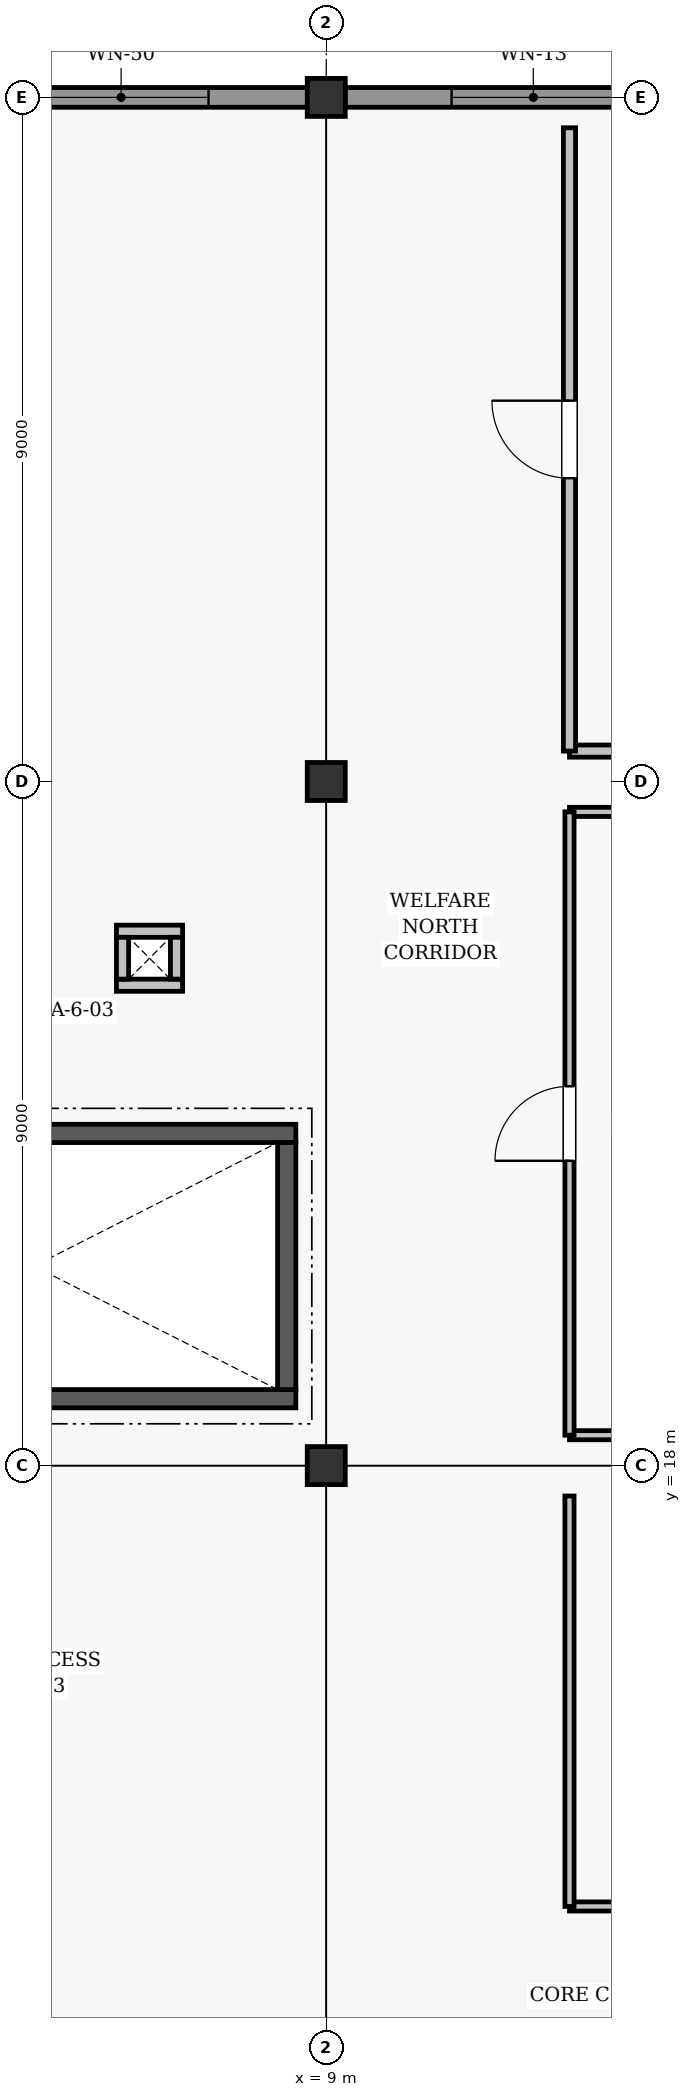
"""IFC4 building model, lengths in metres.
Left out: names, types, materials, properties, quantities, classifications, styles, units other than length and angle.
Written with IfcOpenShell. Run it as: python <this file> out.ifc"""

import sys

from ifc_helpers import new_model, si_unit, direction, frame, frame_2d, origin, origin_2d, place, context, subcontext, project, spatial, rectangle, extrude, element, fill, save


model = new_model("IFC4")
c1 = context("Model", 3, precision=1e-05, world=origin(), true_north=direction((0.0, 1.0)))
c2 = subcontext(c1, "Body", "Model", "MODEL_VIEW")
j1 = project(units=[si_unit("LENGTHUNIT", "METRE"), si_unit("PLANEANGLEUNIT", "RADIAN")], contexts=[c1])
p1 = place(None, origin())
s1 = spatial("IfcSite", under=j1, at=p1, CompositionType="ELEMENT")
p2 = place(p1, origin())
s2 = spatial("IfcBuilding", under=s1, at=p2, CompositionType="ELEMENT")
p3 = place(p2, frame((0.0, 0.0, 12.0)))
s3 = spatial("IfcBuildingStorey", under=s2, at=p3, CompositionType="ELEMENT", Elevation=12.0)
for number, where, z_axis, x_axis in (
    (1, (9.0, 18.0, 0.0), (0.0, 0.0, 1.0), (1.0, 0.0, 0.0)),
    (2, (9.0, 27.0, 0.0), (0.0, 0.0, 1.0), (1.0, 0.0, 0.0)),
    (3, (9.0, 36.0, 0.0), (0.0, 0.0, 1.0), (1.0, 0.0, 0.0)),
):
    element("IfcColumn", number, at=place(p3, frame(where, z_axis=z_axis, x_axis=x_axis)), inside=s3, PredefinedType="COLUMN", context=c2, shape_type="SweptSolid", body=[
        extrude(rectangle(XDim=0.5, YDim=0.5, at=origin_2d()), origin(), (0.0, 0.0, 1.0), 3.0),
    ])
p4 = place(p3, frame((0.248, 36.0, 0.0), z_axis=(0.0, 0.0, 1.0), x_axis=(1.0, 0.0, 0.0)))
e4 = element("IfcWall", 4, at=p4, inside=s3, PredefinedType="SOLIDWALL", context=c2, shape_type="SweptSolid", body=[
    extrude(rectangle(XDim=8.504, YDim=0.26, at=frame_2d((4.252, 0.0))), origin(), (0.0, 0.0, 1.0), 2.262),
])
p5 = place(p4, frame((1.301, 0.0, 0.92)))
e5 = element("IfcOpeningElement", 5, at=p5, cuts=e4, PredefinedType="OPENING", context=c2, shape_type="SweptSolid", body=[
    extrude(rectangle(XDim=2.3, YDim=1.16, at=frame_2d((1.15, 0.58))), frame((0.0, 0.14, 0.0), z_axis=(0.0, -1.0, 0.0), x_axis=(1.0, 0.0, 0.0)), (0.0, 0.0, 1.0), 0.28),
])
p6 = place(p4, frame((4.903, 0.0, 0.92)))
e6 = element("IfcOpeningElement", 6, at=p6, cuts=e4, PredefinedType="OPENING", context=c2, shape_type="SweptSolid", body=[
    extrude(rectangle(XDim=2.3, YDim=1.16, at=frame_2d((1.15, 0.58))), frame((0.0, 0.14, 0.0), z_axis=(0.0, -1.0, 0.0), x_axis=(1.0, 0.0, 0.0)), (0.0, 0.0, 1.0), 0.28),
])
p7 = place(p3, frame((9.248, 36.0, 0.0), z_axis=(0.0, 0.0, 1.0), x_axis=(1.0, 0.0, 0.0)))
e7 = element("IfcWall", 7, at=p7, inside=s3, PredefinedType="SOLIDWALL", context=c2, shape_type="SweptSolid", body=[
    extrude(rectangle(XDim=8.504, YDim=0.26, at=frame_2d((4.252, 0.0))), origin(), (0.0, 0.0, 1.0), 2.262),
])
p8 = place(p7, frame((1.401, 0.0, 0.96)))
e8 = element("IfcOpeningElement", 8, at=p8, cuts=e7, PredefinedType="OPENING", context=c2, shape_type="SweptSolid", body=[
    extrude(rectangle(XDim=2.15, YDim=1.12, at=frame_2d((1.075, 0.56))), frame((0.0, 0.14, 0.0), z_axis=(0.0, -1.0, 0.0), x_axis=(1.0, 0.0, 0.0)), (0.0, 0.0, 1.0), 0.28),
])
p9 = place(p7, frame((4.953, 0.0, 0.96)))
e9 = element("IfcOpeningElement", 9, at=p9, cuts=e7, PredefinedType="OPENING", context=c2, shape_type="SweptSolid", body=[
    extrude(rectangle(XDim=2.15, YDim=1.12, at=frame_2d((1.075, 0.56))), frame((0.0, 0.14, 0.0), z_axis=(0.0, -1.0, 0.0), x_axis=(1.0, 0.0, 0.0)), (0.0, 0.0, 1.0), 0.28),
])
p10 = place(p3, frame((0.16, 18.88, 0.0), z_axis=(0.0, 0.0, 1.0), x_axis=(1.0, 0.0, 0.0)))
e10 = element("IfcWall", 10, at=p10, inside=s3, PredefinedType="SHEAR", context=c2, shape_type="SweptSolid", body=[
    extrude(rectangle(XDim=8.44, YDim=0.24, at=frame_2d((4.22, 0.0))), origin(), (0.0, 0.0, 1.0), 2.75),
])
p11 = place(p10, frame((0.48, 0.0, 0.0)))
e11 = element("IfcOpeningElement", 11, at=p11, cuts=e10, PredefinedType="OPENING", context=c2, shape_type="SweptSolid", body=[
    extrude(rectangle(XDim=1.08, YDim=2.08, at=frame_2d((0.54, 1.04))), frame((0.0, 0.13, 0.0), z_axis=(0.0, -1.0, 0.0), x_axis=(1.0, 0.0, 0.0)), (0.0, 0.0, 1.0), 0.26),
])
p12 = place(p3, frame((0.16, 22.37, 0.0), z_axis=(0.0, 0.0, 1.0), x_axis=(1.0, 0.0, 0.0)))
e12 = element("IfcWall", 12, at=p12, inside=s3, PredefinedType="SHEAR", context=c2, shape_type="SweptSolid", body=[
    extrude(rectangle(XDim=8.44, YDim=0.24, at=frame_2d((4.22, 0.0))), origin(), (0.0, 0.0, 1.0), 2.75),
])
p13 = place(p3, frame((8.48, 19.0, 0.0), z_axis=(0.0, 0.0, 1.0), x_axis=(0.0, 1.0, 0.0)))
e13 = element("IfcWall", 13, at=p13, inside=s3, PredefinedType="SHEAR", context=c2, shape_type="SweptSolid", body=[
    extrude(rectangle(XDim=3.25, YDim=0.24, at=frame_2d((1.625, 0.0))), origin(), (0.0, 0.0, 1.0), 2.75),
])
for number, where, z_axis, x_axis in (
    (14, (6.24, 24.32, 0.0), (0.0, 0.0, 1.0), (1.0, 0.0, 0.0)),
    (15, (6.24, 25.03, 0.0), (0.0, 0.0, 1.0), (1.0, 0.0, 0.0)),
):
    element("IfcWall", number, at=place(p3, frame(where, z_axis=z_axis, x_axis=x_axis)), inside=s3, PredefinedType="PARTITIONING", context=c2, shape_type="SweptSolid", body=[
        extrude(rectangle(XDim=0.87, YDim=0.16, at=frame_2d((0.435, 0.0))), origin(), (0.0, 0.0, 1.0), 2.75),
    ])
for number, where, z_axis, x_axis in (
    (16, (6.32, 24.4, 0.0), (0.0, 0.0, 1.0), (0.0, 1.0, 0.0)),
    (17, (7.03, 24.4, 0.0), (0.0, 0.0, 1.0), (0.0, 1.0, 0.0)),
):
    element("IfcWall", number, at=place(p3, frame(where, z_axis=z_axis, x_axis=x_axis)), inside=s3, PredefinedType="PARTITIONING", context=c2, shape_type="SweptSolid", body=[
        extrude(rectangle(XDim=0.55, YDim=0.16, at=frame_2d((0.275, 0.0))), origin(), (0.0, 0.0, 1.0), 2.75),
    ])
p14 = place(p3, frame((12.2, 12.2, 0.0), z_axis=(0.0, 0.0, 1.0), x_axis=(1.0, 0.0, 0.0)))
e18 = element("IfcWall", 18, at=p14, inside=s3, PredefinedType="PARTITIONING", context=c2, shape_type="SweptSolid", body=[
    extrude(rectangle(XDim=32.4, YDim=0.12, at=frame_2d((16.2, 0.0))), origin(), (0.0, 0.0, 1.0), 2.295),
])
p15 = place(p14, frame((18.43, 0.0, 0.0)))
e19 = element("IfcOpeningElement", 19, at=p15, cuts=e18, PredefinedType="OPENING", context=c2, shape_type="SweptSolid", body=[
    extrude(rectangle(XDim=1.74, YDim=2.18, at=frame_2d((0.87, 1.09))), frame((0.0, 0.07, 0.0), z_axis=(0.0, -1.0, 0.0), x_axis=(1.0, 0.0, 0.0)), (0.0, 0.0, 1.0), 0.14),
])
p16 = place(p3, frame((12.2, 12.2, 0.0), z_axis=(0.0, 0.0, 1.0), x_axis=(0.0, 1.0, 0.0)))
e20 = element("IfcWall", 20, at=p16, inside=s3, PredefinedType="PARTITIONING", context=c2, shape_type="SweptSolid", body=[
    extrude(rectangle(XDim=5.4, YDim=0.12, at=frame_2d((2.7, 0.0))), origin(), (0.0, 0.0, 1.0), 2.75),
])
for number, where, z_axis, x_axis in (
    (21, (12.2, 18.4, 0.0), (0.0, 0.0, 1.0), (1.0, 0.0, 0.0)),
    (22, (12.2, 26.6, 0.0), (0.0, 0.0, 1.0), (1.0, 0.0, 0.0)),
):
    element("IfcWall", number, at=place(p3, frame(where, z_axis=z_axis, x_axis=x_axis)), inside=s3, PredefinedType="PARTITIONING", context=c2, shape_type="SweptSolid", body=[
        extrude(rectangle(XDim=14.4, YDim=0.12, at=frame_2d((7.2, 0.0))), origin(), (0.0, 0.0, 1.0), 2.245),
    ])
p17 = place(p3, frame((12.2, 18.4, 0.0), z_axis=(0.0, 0.0, 1.0), x_axis=(0.0, 1.0, 0.0)))
e23 = element("IfcWall", 23, at=p17, inside=s3, PredefinedType="PARTITIONING", context=c2, shape_type="SweptSolid", body=[
    extrude(rectangle(XDim=8.2, YDim=0.12, at=frame_2d((4.1, 0.0))), origin(), (0.0, 0.0, 1.0), 2.75),
])
p18 = place(p17, frame((3.61, 0.0, 0.0)))
e24 = element("IfcOpeningElement", 24, at=p18, cuts=e23, PredefinedType="OPENING", context=c2, shape_type="SweptSolid", body=[
    extrude(rectangle(XDim=0.98, YDim=2.08, at=frame_2d((0.49, 1.04))), frame((0.0, 0.07, 0.0), z_axis=(0.0, -1.0, 0.0), x_axis=(1.0, 0.0, 0.0)), (0.0, 0.0, 1.0), 0.14),
])
p19 = place(p3, frame((12.2, 27.4, 0.0), z_axis=(0.0, 0.0, 1.0), x_axis=(1.0, 0.0, 0.0)))
e25 = element("IfcWall", 25, at=p19, inside=s3, PredefinedType="PARTITIONING", context=c2, shape_type="SweptSolid", body=[
    extrude(rectangle(XDim=14.4, YDim=0.16, at=frame_2d((7.2, 0.0))), origin(), (0.0, 0.0, 1.0), 2.245),
])
p20 = place(p3, frame((12.2, 27.4, 0.0), z_axis=(0.0, 0.0, 1.0), x_axis=(0.0, 1.0, 0.0)))
e26 = element("IfcWall", 26, at=p20, inside=s3, PredefinedType="PARTITIONING", context=c2, shape_type="SweptSolid", body=[
    extrude(rectangle(XDim=8.2, YDim=0.16, at=frame_2d((4.1, 0.0))), origin(), (0.0, 0.0, 1.0), 2.75),
])
p21 = place(p20, frame((3.59, 0.0, 0.0)))
e27 = element("IfcOpeningElement", 27, at=p21, cuts=e26, PredefinedType="OPENING", context=c2, shape_type="SweptSolid", body=[
    extrude(rectangle(XDim=1.02, YDim=2.1, at=frame_2d((0.51, 1.05))), frame((0.0, 0.09, 0.0), z_axis=(0.0, -1.0, 0.0), x_axis=(1.0, 0.0, 0.0)), (0.0, 0.0, 1.0), 0.18),
])
p22 = place(p6, origin())
e28 = element("IfcWindow", 28, at=p22, inside=s3, PartitioningType="SINGLE_PANEL", PredefinedType="WINDOW", context=c2, shape_type="SweptSolid", body=[
    extrude(rectangle(XDim=2.3, YDim=1.16, at=frame_2d((1.15, 0.58))), frame((0.0, 0.03, 0.0), z_axis=(0.0, -1.0, 0.0), x_axis=(1.0, 0.0, 0.0)), (0.0, 0.0, 1.0), 0.06),
])
fill(e6, e28)
p23 = place(p8, origin())
e29 = element("IfcWindow", 29, at=p23, inside=s3, PartitioningType="SINGLE_PANEL", PredefinedType="WINDOW", context=c2, shape_type="SweptSolid", body=[
    extrude(rectangle(XDim=2.15, YDim=1.12, at=frame_2d((1.075, 0.56))), frame((0.0, 0.03, 0.0), z_axis=(0.0, -1.0, 0.0), x_axis=(1.0, 0.0, 0.0)), (0.0, 0.0, 1.0), 0.06),
])
fill(e8, e29)
p24 = place(p18, origin())
e30 = element("IfcDoor", 30, at=p24, inside=s3, OperationType="SINGLE_SWING_LEFT", PredefinedType="DOOR", context=c2, shape_type="SweptSolid", body=[
    extrude(rectangle(XDim=0.98, YDim=2.08, at=frame_2d((0.49, 1.04))), frame((0.0, 0.025, 0.0), z_axis=(0.0, -1.0, 0.0), x_axis=(1.0, 0.0, 0.0)), (0.0, 0.0, 1.0), 0.05),
])
fill(e24, e30)
p25 = place(p21, origin())
e31 = element("IfcDoor", 31, at=p25, inside=s3, OperationType="SINGLE_SWING_RIGHT", PredefinedType="DOOR", context=c2, shape_type="SweptSolid", body=[
    extrude(rectangle(XDim=1.02, YDim=2.1, at=frame_2d((0.51, 1.05))), frame((0.0, 0.025, 0.0), z_axis=(0.0, -1.0, 0.0), x_axis=(1.0, 0.0, 0.0)), (0.0, 0.0, 1.0), 0.05),
])
fill(e27, e31)
save(model, sys.argv[1])
